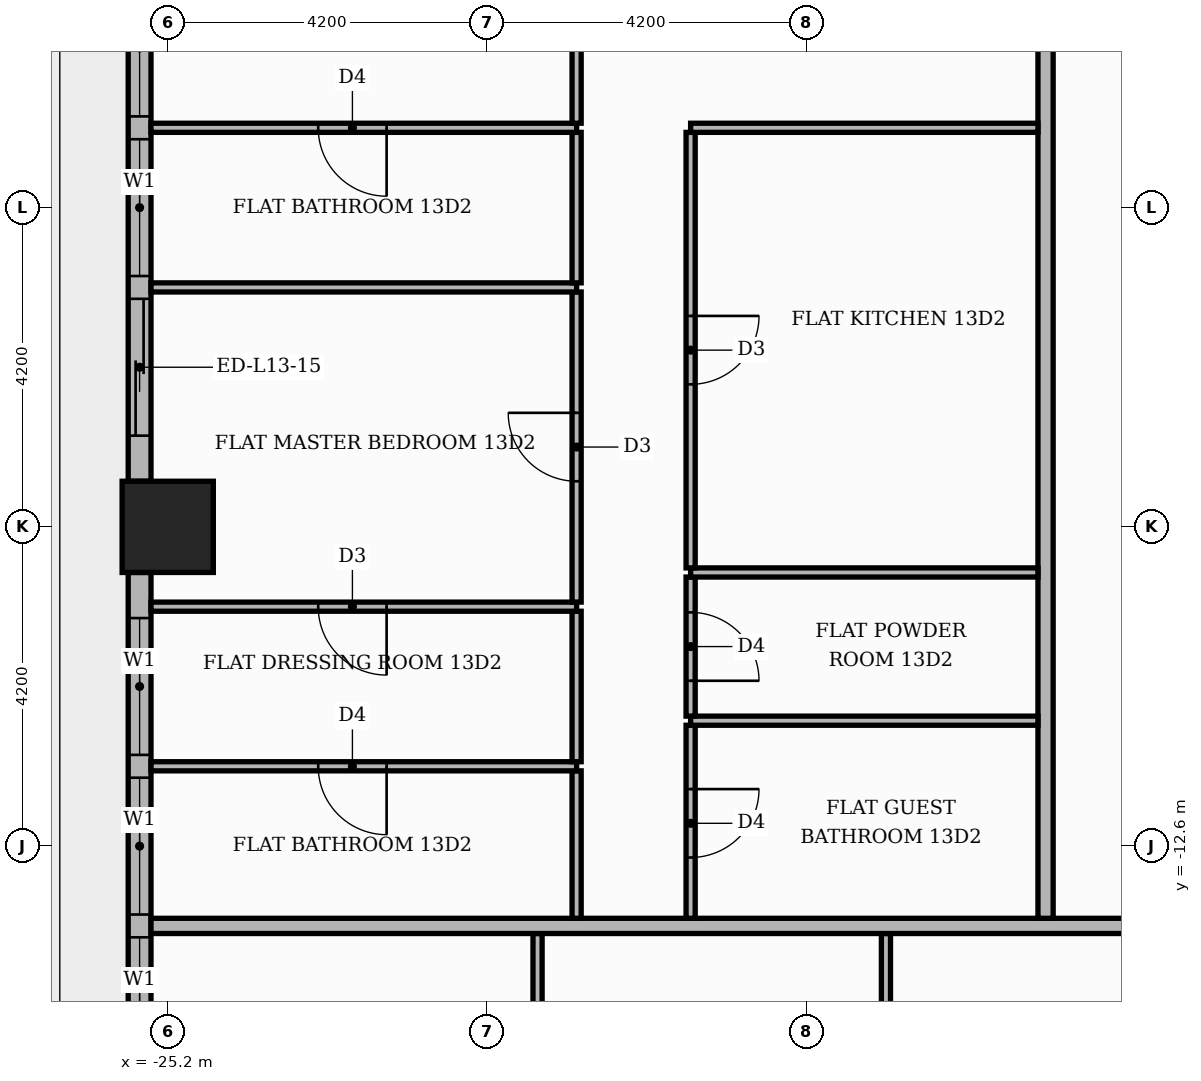
"""IFC4 building model, lengths in metres.
Left out: names, types, materials, properties, quantities, classifications, styles, units other than length and angle.
Written with IfcOpenShell. Run it as: python <this file> out.ifc"""

import sys

from ifc_helpers import new_model, si_unit, direction, frame, frame_2d, origin, origin_2d, place, context, subcontext, project, spatial, rectangle, extrude, element, fill, save


model = new_model("IFC4")
c1 = context("Model", 3, precision=1e-05, world=origin(), true_north=direction((0.0, 1.0)))
c2 = subcontext(c1, "Body", "Model", "MODEL_VIEW")
j1 = project(units=[si_unit("LENGTHUNIT", "METRE"), si_unit("PLANEANGLEUNIT", "RADIAN")], contexts=[c1])
p1 = place(None, origin())
s1 = spatial("IfcSite", under=j1, at=p1, CompositionType="ELEMENT")
p2 = place(p1, origin())
s2 = spatial("IfcBuilding", under=s1, at=p2, CompositionType="ELEMENT")
p3 = place(p2, frame((0.0, 0.0, 58.2)))
s3 = spatial("IfcBuildingStorey", under=s2, at=p3, CompositionType="ELEMENT", Elevation=58.2)
p4 = place(p3, frame((-25.2, -8.4, 0.0), z_axis=(0.0, 0.0, 1.0), x_axis=(1.0, 0.0, 0.0)))
e1 = element("IfcColumn", 1, at=p4, inside=s3, PredefinedType="COLUMN", context=c2, shape_type="SweptSolid", body=[
    extrude(rectangle(XDim=1.2, YDim=1.2, at=origin_2d()), origin(), (0.0, 0.0, 1.0), 3.9),
])
p5 = place(p3, frame((-25.57, -0.6, 0.0), z_axis=(0.0, 0.0, 1.0), x_axis=(0.0, -1.0, 0.0)))
e2 = element("IfcWall", 2, at=p5, inside=s3, PredefinedType="STANDARD", context=c2, shape_type="SweptSolid", body=[
    extrude(rectangle(XDim=7.2, YDim=0.3, at=frame_2d((3.6, 0.0))), origin(), (0.0, 0.0, 1.0), 3.48),
])
p6 = place(p5, frame((0.6, 0.0, 0.9)))
e3 = element("IfcOpeningElement", 3, at=p6, cuts=e2, PredefinedType="OPENING", context=c2, shape_type="SweptSolid", body=[
    extrude(rectangle(XDim=1.8, YDim=2.1, at=frame_2d((0.9, 1.05))), frame((0.0, 0.16, 0.0), z_axis=(0.0, -1.0, 0.0), x_axis=(1.0, 0.0, 0.0)), (0.0, 0.0, 1.0), 0.32),
])
p7 = place(p5, frame((2.7, 0.0, 0.9)))
e4 = element("IfcOpeningElement", 4, at=p7, cuts=e2, PredefinedType="OPENING", context=c2, shape_type="SweptSolid", body=[
    extrude(rectangle(XDim=1.8, YDim=2.1, at=frame_2d((0.9, 1.05))), frame((0.0, 0.16, 0.0), z_axis=(0.0, -1.0, 0.0), x_axis=(1.0, 0.0, 0.0)), (0.0, 0.0, 1.0), 0.32),
])
p8 = place(p5, frame((4.8, 0.0, 0.0)))
e5 = element("IfcOpeningElement", 5, at=p8, cuts=e2, PredefinedType="OPENING", context=c2, shape_type="SweptSolid", body=[
    extrude(rectangle(XDim=1.8, YDim=2.4, at=frame_2d((0.9, 1.2))), frame((0.0, 0.16, 0.0), z_axis=(0.0, -1.0, 0.0), x_axis=(1.0, 0.0, 0.0)), (0.0, 0.0, 1.0), 0.32),
])
p9 = place(p3, frame((-25.57, -9.0, 0.0), z_axis=(0.0, 0.0, 1.0), x_axis=(0.0, -1.0, 0.0)))
e6 = element("IfcWall", 6, at=p9, inside=s3, PredefinedType="STANDARD", context=c2, shape_type="SweptSolid", body=[
    extrude(rectangle(XDim=7.2, YDim=0.3, at=frame_2d((3.6, 0.0))), origin(), (0.0, 0.0, 1.0), 3.48),
])
p10 = place(p9, frame((0.6, 0.0, 0.9)))
e7 = element("IfcOpeningElement", 7, at=p10, cuts=e6, PredefinedType="OPENING", context=c2, shape_type="SweptSolid", body=[
    extrude(rectangle(XDim=1.8, YDim=2.1, at=frame_2d((0.9, 1.05))), frame((0.0, 0.16, 0.0), z_axis=(0.0, -1.0, 0.0), x_axis=(1.0, 0.0, 0.0)), (0.0, 0.0, 1.0), 0.32),
])
p11 = place(p9, frame((2.7, 0.0, 0.9)))
e8 = element("IfcOpeningElement", 8, at=p11, cuts=e6, PredefinedType="OPENING", context=c2, shape_type="SweptSolid", body=[
    extrude(rectangle(XDim=1.8, YDim=2.1, at=frame_2d((0.9, 1.05))), frame((0.0, 0.16, 0.0), z_axis=(0.0, -1.0, 0.0), x_axis=(1.0, 0.0, 0.0)), (0.0, 0.0, 1.0), 0.32),
])
p12 = place(p9, frame((4.8, 0.0, 0.9)))
e9 = element("IfcOpeningElement", 9, at=p12, cuts=e6, PredefinedType="OPENING", context=c2, shape_type="SweptSolid", body=[
    extrude(rectangle(XDim=1.8, YDim=2.1, at=frame_2d((0.9, 1.05))), frame((0.0, 0.16, 0.0), z_axis=(0.0, -1.0, 0.0), x_axis=(1.0, 0.0, 0.0)), (0.0, 0.0, 1.0), 0.32),
])
p13 = place(p3, frame((-20.334, -20.66, 0.0), z_axis=(0.0, 0.0, 1.0), x_axis=(0.0, 1.0, 0.0)))
e10 = element("IfcWall", 10, at=p13, inside=s3, PredefinedType="PARTITIONING", context=c2, shape_type="SweptSolid", body=[
    extrude(rectangle(XDim=6.91, YDim=0.12, at=frame_2d((3.455, 0.0))), origin(), (0.0, 0.0, 1.0), 3.48),
])
p14 = place(p13, frame((4.792, 0.0, 0.0)))
e11 = element("IfcOpeningElement", 11, at=p14, cuts=e10, PredefinedType="OPENING", context=c2, shape_type="SweptSolid", body=[
    extrude(rectangle(XDim=0.9, YDim=2.1, at=frame_2d((0.45, 1.05))), frame((0.0, 0.07, 0.0), z_axis=(0.0, -1.0, 0.0), x_axis=(1.0, 0.0, 0.0)), (0.0, 0.0, 1.0), 0.14),
])
p15 = place(p3, frame((-15.75, -20.66, 0.0), z_axis=(0.0, 0.0, 1.0), x_axis=(0.0, 1.0, 0.0)))
e12 = element("IfcWall", 12, at=p15, inside=s3, PredefinedType="PARTITIONING", context=c2, shape_type="SweptSolid", body=[
    extrude(rectangle(XDim=6.91, YDim=0.12, at=frame_2d((3.455, 0.0))), origin(), (0.0, 0.0, 1.0), 3.48),
])
p16 = place(p15, frame((2.975, 0.0, 0.0)))
e13 = element("IfcOpeningElement", 13, at=p16, cuts=e12, PredefinedType="OPENING", context=c2, shape_type="SweptSolid", body=[
    extrude(rectangle(XDim=1.0, YDim=2.1, at=frame_2d((0.5, 1.05))), frame((0.0, 0.07, 0.0), z_axis=(0.0, -1.0, 0.0), x_axis=(1.0, 0.0, 0.0)), (0.0, 0.0, 1.0), 0.14),
])
p17 = place(p3, frame((-25.42, -13.65, 0.0), z_axis=(0.0, 0.0, 1.0), x_axis=(1.0, 0.0, 0.0)))
e14 = element("IfcWall", 14, at=p17, inside=s3, PredefinedType="PARTITIONING", context=c2, shape_type="SweptSolid", body=[
    extrude(rectangle(XDim=39.07, YDim=0.2, at=frame_2d((19.535, 0.0))), origin(), (0.0, 0.0, 1.0), 3.48),
])
p18 = place(p17, frame((13.32, 0.0, 0.0)))
e15 = element("IfcOpeningElement", 15, at=p18, cuts=e14, PredefinedType="OPENING", context=c2, shape_type="SweptSolid", body=[
    extrude(rectangle(XDim=1.1, YDim=2.4, at=frame_2d((0.55, 1.2))), frame((0.0, 0.11, 0.0), z_axis=(0.0, -1.0, 0.0), x_axis=(1.0, 0.0, 0.0)), (0.0, 0.0, 1.0), 0.22),
])
p19 = place(p17, frame((25.92, 0.0, 0.0)))
e16 = element("IfcOpeningElement", 16, at=p19, cuts=e14, PredefinedType="OPENING", context=c2, shape_type="SweptSolid", body=[
    extrude(rectangle(XDim=1.1, YDim=2.4, at=frame_2d((0.55, 1.2))), frame((0.0, 0.11, 0.0), z_axis=(0.0, -1.0, 0.0), x_axis=(1.0, 0.0, 0.0)), (0.0, 0.0, 1.0), 0.22),
])
p20 = place(p3, frame((-19.82, -13.55, 0.0), z_axis=(0.0, 0.0, 1.0), x_axis=(0.0, 1.0, 0.0)))
e17 = element("IfcWall", 17, at=p20, inside=s3, PredefinedType="PARTITIONING", context=c2, shape_type="SweptSolid", body=[
    extrude(rectangle(XDim=1.94, YDim=0.12, at=frame_2d((0.97, 0.0))), origin(), (0.0, 0.0, 1.0), 3.48),
])
p21 = place(p3, frame((-18.32, -13.55, 0.0), z_axis=(0.0, 0.0, 1.0), x_axis=(0.0, 1.0, 0.0)))
e18 = element("IfcWall", 18, at=p21, inside=s3, PredefinedType="PARTITIONING", context=c2, shape_type="SweptSolid", body=[
    extrude(rectangle(XDim=2.54, YDim=0.12, at=frame_2d((1.27, 0.0))), origin(), (0.0, 0.0, 1.0), 3.48),
])
p22 = place(p21, frame((0.8, 0.0, 0.0)))
e19 = element("IfcOpeningElement", 19, at=p22, cuts=e18, PredefinedType="OPENING", context=c2, shape_type="SweptSolid", body=[
    extrude(rectangle(XDim=0.9, YDim=2.1, at=frame_2d((0.45, 1.05))), frame((0.0, 0.07, 0.0), z_axis=(0.0, -1.0, 0.0), x_axis=(1.0, 0.0, 0.0)), (0.0, 0.0, 1.0), 0.14),
])
p23 = place(p3, frame((-13.65, -13.55, 0.0), z_axis=(0.0, 0.0, 1.0), x_axis=(0.0, 1.0, 0.0)))
e20 = element("IfcWall", 20, at=p23, inside=s3, PredefinedType="PARTITIONING", context=c2, shape_type="SweptSolid", body=[
    extrude(rectangle(XDim=18.7, YDim=0.2, at=frame_2d((9.35, 0.0))), origin(), (0.0, 0.0, 1.0), 3.48),
])
p24 = place(p23, frame((11.95, 0.0, 0.0)))
e21 = element("IfcOpeningElement", 21, at=p24, cuts=e20, PredefinedType="OPENING", context=c2, shape_type="SweptSolid", body=[
    extrude(rectangle(XDim=1.1, YDim=2.4, at=frame_2d((0.55, 1.2))), frame((0.0, 0.11, 0.0), z_axis=(0.0, -1.0, 0.0), x_axis=(1.0, 0.0, 0.0)), (0.0, 0.0, 1.0), 0.22),
])
p25 = place(p3, frame((-25.42, -11.55, 0.0), z_axis=(0.0, 0.0, 1.0), x_axis=(1.0, 0.0, 0.0)))
e22 = element("IfcWall", 22, at=p25, inside=s3, PredefinedType="PARTITIONING", context=c2, shape_type="SweptSolid", body=[
    extrude(rectangle(XDim=5.6, YDim=0.12, at=frame_2d((2.8, 0.0))), origin(), (0.0, 0.0, 1.0), 3.48),
])
p26 = place(p25, frame((2.2, 0.0, 0.0)))
e23 = element("IfcOpeningElement", 23, at=p26, cuts=e22, PredefinedType="OPENING", context=c2, shape_type="SweptSolid", body=[
    extrude(rectangle(XDim=0.9, YDim=2.1, at=frame_2d((0.45, 1.05))), frame((0.0, 0.07, 0.0), z_axis=(0.0, -1.0, 0.0), x_axis=(1.0, 0.0, 0.0)), (0.0, 0.0, 1.0), 0.14),
])
p27 = place(p3, frame((-19.82, -11.49, 0.0), z_axis=(0.0, 0.0, 1.0), x_axis=(0.0, 1.0, 0.0)))
e24 = element("IfcWall", 24, at=p27, inside=s3, PredefinedType="PARTITIONING", context=c2, shape_type="SweptSolid", body=[
    extrude(rectangle(XDim=1.98, YDim=0.12, at=frame_2d((0.99, 0.0))), origin(), (0.0, 0.0, 1.0), 3.48),
])
p28 = place(p3, frame((-18.32, -10.95, 0.0), z_axis=(0.0, 0.0, 1.0), x_axis=(1.0, 0.0, 0.0)))
e25 = element("IfcWall", 25, at=p28, inside=s3, PredefinedType="PARTITIONING", context=c2, shape_type="SweptSolid", body=[
    extrude(rectangle(XDim=4.57, YDim=0.12, at=frame_2d((2.285, 0.0))), origin(), (0.0, 0.0, 1.0), 3.48),
])
p29 = place(p3, frame((-18.32, -10.89, 0.0), z_axis=(0.0, 0.0, 1.0), x_axis=(0.0, 1.0, 0.0)))
e26 = element("IfcWall", 26, at=p29, inside=s3, PredefinedType="PARTITIONING", context=c2, shape_type="SweptSolid", body=[
    extrude(rectangle(XDim=1.83, YDim=0.12, at=frame_2d((0.915, 0.0))), origin(), (0.0, 0.0, 1.0), 3.48),
])
p30 = place(p29, frame((0.465, 0.0, 0.0)))
e27 = element("IfcOpeningElement", 27, at=p30, cuts=e26, PredefinedType="OPENING", context=c2, shape_type="SweptSolid", body=[
    extrude(rectangle(XDim=0.9, YDim=2.1, at=frame_2d((0.45, 1.05))), frame((0.0, 0.07, 0.0), z_axis=(0.0, -1.0, 0.0), x_axis=(1.0, 0.0, 0.0)), (0.0, 0.0, 1.0), 0.14),
])
p31 = place(p3, frame((-25.42, -9.45, 0.0), z_axis=(0.0, 0.0, 1.0), x_axis=(1.0, 0.0, 0.0)))
e28 = element("IfcWall", 28, at=p31, inside=s3, PredefinedType="PARTITIONING", context=c2, shape_type="SweptSolid", body=[
    extrude(rectangle(XDim=5.6, YDim=0.12, at=frame_2d((2.8, 0.0))), origin(), (0.0, 0.0, 1.0), 3.48),
])
p32 = place(p31, frame((2.2, 0.0, 0.0)))
e29 = element("IfcOpeningElement", 29, at=p32, cuts=e28, PredefinedType="OPENING", context=c2, shape_type="SweptSolid", body=[
    extrude(rectangle(XDim=0.9, YDim=2.1, at=frame_2d((0.45, 1.05))), frame((0.0, 0.07, 0.0), z_axis=(0.0, -1.0, 0.0), x_axis=(1.0, 0.0, 0.0)), (0.0, 0.0, 1.0), 0.14),
])
p33 = place(p3, frame((-19.82, -9.39, 0.0), z_axis=(0.0, 0.0, 1.0), x_axis=(0.0, 1.0, 0.0)))
e30 = element("IfcWall", 30, at=p33, inside=s3, PredefinedType="PARTITIONING", context=c2, shape_type="SweptSolid", body=[
    extrude(rectangle(XDim=4.08, YDim=0.12, at=frame_2d((2.04, 0.0))), origin(), (0.0, 0.0, 1.0), 3.48),
])
p34 = place(p33, frame((1.59, 0.0, 0.0)))
e31 = element("IfcOpeningElement", 31, at=p34, cuts=e30, PredefinedType="OPENING", context=c2, shape_type="SweptSolid", body=[
    extrude(rectangle(XDim=0.9, YDim=2.1, at=frame_2d((0.45, 1.05))), frame((0.0, 0.07, 0.0), z_axis=(0.0, -1.0, 0.0), x_axis=(1.0, 0.0, 0.0)), (0.0, 0.0, 1.0), 0.14),
])
p35 = place(p3, frame((-18.32, -9.0, 0.0), z_axis=(0.0, 0.0, 1.0), x_axis=(1.0, 0.0, 0.0)))
e32 = element("IfcWall", 32, at=p35, inside=s3, PredefinedType="PARTITIONING", context=c2, shape_type="SweptSolid", body=[
    extrude(rectangle(XDim=4.57, YDim=0.12, at=frame_2d((2.285, 0.0))), origin(), (0.0, 0.0, 1.0), 3.48),
])
p36 = place(p3, frame((-18.32, -8.94, 0.0), z_axis=(0.0, 0.0, 1.0), x_axis=(0.0, 1.0, 0.0)))
e33 = element("IfcWall", 33, at=p36, inside=s3, PredefinedType="PARTITIONING", context=c2, shape_type="SweptSolid", body=[
    extrude(rectangle(XDim=5.73, YDim=0.12, at=frame_2d((2.865, 0.0))), origin(), (0.0, 0.0, 1.0), 3.48),
])
p37 = place(p36, frame((2.415, 0.0, 0.0)))
e34 = element("IfcOpeningElement", 34, at=p37, cuts=e33, PredefinedType="OPENING", context=c2, shape_type="SweptSolid", body=[
    extrude(rectangle(XDim=0.9, YDim=2.1, at=frame_2d((0.45, 1.05))), frame((0.0, 0.07, 0.0), z_axis=(0.0, -1.0, 0.0), x_axis=(1.0, 0.0, 0.0)), (0.0, 0.0, 1.0), 0.14),
])
p38 = place(p3, frame((-25.42, -5.25, 0.0), z_axis=(0.0, 0.0, 1.0), x_axis=(1.0, 0.0, 0.0)))
e35 = element("IfcWall", 35, at=p38, inside=s3, PredefinedType="PARTITIONING", context=c2, shape_type="SweptSolid", body=[
    extrude(rectangle(XDim=5.6, YDim=0.12, at=frame_2d((2.8, 0.0))), origin(), (0.0, 0.0, 1.0), 3.48),
])
p39 = place(p3, frame((-19.82, -5.19, 0.0), z_axis=(0.0, 0.0, 1.0), x_axis=(0.0, 1.0, 0.0)))
e36 = element("IfcWall", 36, at=p39, inside=s3, PredefinedType="PARTITIONING", context=c2, shape_type="SweptSolid", body=[
    extrude(rectangle(XDim=1.98, YDim=0.12, at=frame_2d((0.99, 0.0))), origin(), (0.0, 0.0, 1.0), 3.48),
])
p40 = place(p3, frame((-25.42, -3.15, 0.0), z_axis=(0.0, 0.0, 1.0), x_axis=(1.0, 0.0, 0.0)))
e37 = element("IfcWall", 37, at=p40, inside=s3, PredefinedType="PARTITIONING", context=c2, shape_type="SweptSolid", body=[
    extrude(rectangle(XDim=5.6, YDim=0.12, at=frame_2d((2.8, 0.0))), origin(), (0.0, 0.0, 1.0), 3.48),
])
p41 = place(p40, frame((2.2, 0.0, 0.0)))
e38 = element("IfcOpeningElement", 38, at=p41, cuts=e37, PredefinedType="OPENING", context=c2, shape_type="SweptSolid", body=[
    extrude(rectangle(XDim=0.9, YDim=2.1, at=frame_2d((0.45, 1.05))), frame((0.0, 0.07, 0.0), z_axis=(0.0, -1.0, 0.0), x_axis=(1.0, 0.0, 0.0)), (0.0, 0.0, 1.0), 0.14),
])
p42 = place(p3, frame((-18.32, -3.15, 0.0), z_axis=(0.0, 0.0, 1.0), x_axis=(1.0, 0.0, 0.0)))
e39 = element("IfcWall", 39, at=p42, inside=s3, PredefinedType="PARTITIONING", context=c2, shape_type="SweptSolid", body=[
    extrude(rectangle(XDim=4.57, YDim=0.12, at=frame_2d((2.285, 0.0))), origin(), (0.0, 0.0, 1.0), 3.48),
])
p43 = place(p3, frame((-19.82, -3.09, 0.0), z_axis=(0.0, 0.0, 1.0), x_axis=(0.0, 1.0, 0.0)))
e40 = element("IfcWall", 40, at=p43, inside=s3, PredefinedType="PARTITIONING", context=c2, shape_type="SweptSolid", body=[
    extrude(rectangle(XDim=4.08, YDim=0.12, at=frame_2d((2.04, 0.0))), origin(), (0.0, 0.0, 1.0), 3.48),
])
p44 = place(p43, frame((1.59, 0.0, 0.0)))
e41 = element("IfcOpeningElement", 41, at=p44, cuts=e40, PredefinedType="OPENING", context=c2, shape_type="SweptSolid", body=[
    extrude(rectangle(XDim=0.9, YDim=2.1, at=frame_2d((0.45, 1.05))), frame((0.0, 0.07, 0.0), z_axis=(0.0, -1.0, 0.0), x_axis=(1.0, 0.0, 0.0)), (0.0, 0.0, 1.0), 0.14),
])
p45 = place(p6, origin())
e42 = element("IfcWindow", 42, at=p45, inside=s3, PartitioningType="SINGLE_PANEL", PredefinedType="WINDOW", context=c2, shape_type="SweptSolid", body=[
    extrude(rectangle(XDim=1.8, YDim=2.1, at=frame_2d((0.9, 1.05))), frame((0.0, 0.03, 0.0), z_axis=(0.0, -1.0, 0.0), x_axis=(1.0, 0.0, 0.0)), (0.0, 0.0, 1.0), 0.06),
])
fill(e3, e42)
p46 = place(p7, origin())
e43 = element("IfcWindow", 43, at=p46, inside=s3, PartitioningType="SINGLE_PANEL", PredefinedType="WINDOW", context=c2, shape_type="SweptSolid", body=[
    extrude(rectangle(XDim=1.8, YDim=2.1, at=frame_2d((0.9, 1.05))), frame((0.0, 0.03, 0.0), z_axis=(0.0, -1.0, 0.0), x_axis=(1.0, 0.0, 0.0)), (0.0, 0.0, 1.0), 0.06),
])
fill(e4, e43)
p47 = place(p8, origin())
e44 = element("IfcDoor", 44, at=p47, inside=s3, OperationType="SLIDING_TO_RIGHT", PredefinedType="DOOR", context=c2, shape_type="SweptSolid", body=[
    extrude(rectangle(XDim=1.8, YDim=2.4, at=frame_2d((0.9, 1.2))), frame((0.0, 0.025, 0.0), z_axis=(0.0, -1.0, 0.0), x_axis=(1.0, 0.0, 0.0)), (0.0, 0.0, 1.0), 0.05),
])
fill(e5, e44)
p48 = place(p10, origin())
e45 = element("IfcWindow", 45, at=p48, inside=s3, PartitioningType="SINGLE_PANEL", PredefinedType="WINDOW", context=c2, shape_type="SweptSolid", body=[
    extrude(rectangle(XDim=1.8, YDim=2.1, at=frame_2d((0.9, 1.05))), frame((0.0, 0.03, 0.0), z_axis=(0.0, -1.0, 0.0), x_axis=(1.0, 0.0, 0.0)), (0.0, 0.0, 1.0), 0.06),
])
fill(e7, e45)
p49 = place(p11, origin())
e46 = element("IfcWindow", 46, at=p49, inside=s3, PartitioningType="SINGLE_PANEL", PredefinedType="WINDOW", context=c2, shape_type="SweptSolid", body=[
    extrude(rectangle(XDim=1.8, YDim=2.1, at=frame_2d((0.9, 1.05))), frame((0.0, 0.03, 0.0), z_axis=(0.0, -1.0, 0.0), x_axis=(1.0, 0.0, 0.0)), (0.0, 0.0, 1.0), 0.06),
])
fill(e8, e46)
p50 = place(p12, origin())
e47 = element("IfcWindow", 47, at=p50, inside=s3, PartitioningType="SINGLE_PANEL", PredefinedType="WINDOW", context=c2, shape_type="SweptSolid", body=[
    extrude(rectangle(XDim=1.8, YDim=2.1, at=frame_2d((0.9, 1.05))), frame((0.0, 0.03, 0.0), z_axis=(0.0, -1.0, 0.0), x_axis=(1.0, 0.0, 0.0)), (0.0, 0.0, 1.0), 0.06),
])
fill(e9, e47)
p51 = place(p37, frame((0.9, 0.0, 0.0), z_axis=(0.0, 0.0, 1.0), x_axis=(-1.0, 0.0, 0.0)))
e48 = element("IfcDoor", 48, at=p51, inside=s3, OperationType="SINGLE_SWING_RIGHT", PredefinedType="DOOR", context=c2, shape_type="SweptSolid", body=[
    extrude(rectangle(XDim=0.9, YDim=2.1, at=frame_2d((0.45, 1.05))), frame((0.0, 0.025, 0.0), z_axis=(0.0, -1.0, 0.0), x_axis=(1.0, 0.0, 0.0)), (0.0, 0.0, 1.0), 0.05),
])
fill(e34, e48)
p52 = place(p30, frame((0.9, 0.0, 0.0), z_axis=(0.0, 0.0, 1.0), x_axis=(-1.0, 0.0, 0.0)))
e49 = element("IfcDoor", 49, at=p52, inside=s3, OperationType="SINGLE_SWING_LEFT", PredefinedType="DOOR", context=c2, shape_type="SweptSolid", body=[
    extrude(rectangle(XDim=0.9, YDim=2.1, at=frame_2d((0.45, 1.05))), frame((0.0, 0.025, 0.0), z_axis=(0.0, -1.0, 0.0), x_axis=(1.0, 0.0, 0.0)), (0.0, 0.0, 1.0), 0.05),
])
fill(e27, e49)
p53 = place(p22, frame((0.9, 0.0, 0.0), z_axis=(0.0, 0.0, 1.0), x_axis=(-1.0, 0.0, 0.0)))
e50 = element("IfcDoor", 50, at=p53, inside=s3, OperationType="SINGLE_SWING_RIGHT", PredefinedType="DOOR", context=c2, shape_type="SweptSolid", body=[
    extrude(rectangle(XDim=0.9, YDim=2.1, at=frame_2d((0.45, 1.05))), frame((0.0, 0.025, 0.0), z_axis=(0.0, -1.0, 0.0), x_axis=(1.0, 0.0, 0.0)), (0.0, 0.0, 1.0), 0.05),
])
fill(e19, e50)
p54 = place(p41, frame((0.9, 0.0, 0.0), z_axis=(0.0, 0.0, 1.0), x_axis=(-1.0, 0.0, 0.0)))
e51 = element("IfcDoor", 51, at=p54, inside=s3, OperationType="SINGLE_SWING_RIGHT", PredefinedType="DOOR", context=c2, shape_type="SweptSolid", body=[
    extrude(rectangle(XDim=0.9, YDim=2.1, at=frame_2d((0.45, 1.05))), frame((0.0, 0.025, 0.0), z_axis=(0.0, -1.0, 0.0), x_axis=(1.0, 0.0, 0.0)), (0.0, 0.0, 1.0), 0.05),
])
fill(e38, e51)
p55 = place(p34, origin())
e52 = element("IfcDoor", 52, at=p55, inside=s3, OperationType="SINGLE_SWING_RIGHT", PredefinedType="DOOR", context=c2, shape_type="SweptSolid", body=[
    extrude(rectangle(XDim=0.9, YDim=2.1, at=frame_2d((0.45, 1.05))), frame((0.0, 0.025, 0.0), z_axis=(0.0, -1.0, 0.0), x_axis=(1.0, 0.0, 0.0)), (0.0, 0.0, 1.0), 0.05),
])
fill(e31, e52)
p56 = place(p32, frame((0.9, 0.0, 0.0), z_axis=(0.0, 0.0, 1.0), x_axis=(-1.0, 0.0, 0.0)))
e53 = element("IfcDoor", 53, at=p56, inside=s3, OperationType="SINGLE_SWING_RIGHT", PredefinedType="DOOR", context=c2, shape_type="SweptSolid", body=[
    extrude(rectangle(XDim=0.9, YDim=2.1, at=frame_2d((0.45, 1.05))), frame((0.0, 0.025, 0.0), z_axis=(0.0, -1.0, 0.0), x_axis=(1.0, 0.0, 0.0)), (0.0, 0.0, 1.0), 0.05),
])
fill(e29, e53)
p57 = place(p26, frame((0.9, 0.0, 0.0), z_axis=(0.0, 0.0, 1.0), x_axis=(-1.0, 0.0, 0.0)))
e54 = element("IfcDoor", 54, at=p57, inside=s3, OperationType="SINGLE_SWING_RIGHT", PredefinedType="DOOR", context=c2, shape_type="SweptSolid", body=[
    extrude(rectangle(XDim=0.9, YDim=2.1, at=frame_2d((0.45, 1.05))), frame((0.0, 0.025, 0.0), z_axis=(0.0, -1.0, 0.0), x_axis=(1.0, 0.0, 0.0)), (0.0, 0.0, 1.0), 0.05),
])
fill(e23, e54)
save(model, sys.argv[1])
